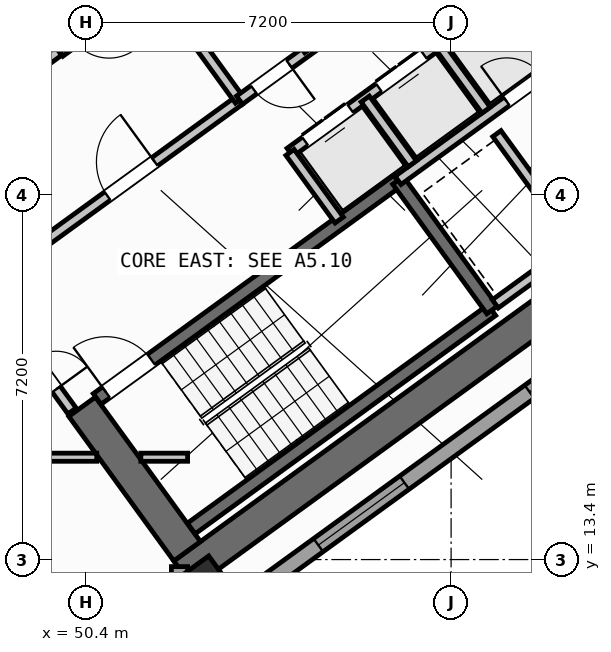
"""IFC4 building model, lengths in metres.
Left out: names, types, materials, properties, quantities, classifications, styles, units other than length and angle.
Written with IfcOpenShell. Run it as: python <this file> out.ifc"""

import sys

from ifc_helpers import new_model, si_unit, direction, frame, frame_2d, origin, origin_2d, place, context, subcontext, project, spatial, rectangle, hollow_rectangle, extrude, source, transform, mapped, element, fill, save


model = new_model("IFC4")
c1 = context("Model", 3, precision=1e-05, world=origin(), true_north=direction((0.0, 1.0)))
c2 = subcontext(c1, "Body", "Model", "MODEL_VIEW")
j1 = project(units=[si_unit("LENGTHUNIT", "METRE"), si_unit("PLANEANGLEUNIT", "RADIAN")], contexts=[c1])
p1 = place(None, origin())
s1 = spatial("IfcSite", under=j1, at=p1, CompositionType="ELEMENT")
p2 = place(p1, origin())
s2 = spatial("IfcBuilding", under=s1, at=p2, CompositionType="ELEMENT")
p3 = place(p2, frame((0.0, 0.0, 81.0)))
s3 = spatial("IfcBuildingStorey", under=s2, at=p3, CompositionType="ELEMENT", Elevation=81.0)
p4 = place(p3, frame((52.318, 13.11, 0.0), z_axis=(0.0, 0.0, 1.0), x_axis=(0.809019445368, 0.587781878776, 0.0)))
e1 = element("IfcWall", 1, at=p4, inside=s3, PredefinedType="SHEAR", context=c2, shape_type="SweptSolid", body=[
    extrude(rectangle(XDim=12.44, YDim=0.65, at=frame_2d((6.22, 0.0))), origin(), (0.0, 0.0, 1.0), 3.32),
])
p5 = place(p3, frame((52.39, 13.564, 0.0), z_axis=(0.0, 0.0, 1.0), x_axis=(-0.58779688989, 0.809008539037, 0.0)))
e2 = element("IfcWall", 2, at=p5, inside=s3, PredefinedType="SHEAR", context=c2, shape_type="SweptSolid", body=[
    extrude(rectangle(XDim=3.525, YDim=0.65, at=frame_2d((1.763, 0.0))), origin(), (0.0, 0.0, 1.0), 3.32),
])
m1 = source(origin(), c2, "Body", "SweptSolid", [
    extrude(hollow_rectangle(XDim=1.0, YDim=1.0, WallThickness=0.04, at=origin_2d()), origin(), (0.0, 0.0, 1.0), 3.6),
])
p6 = place(p3, frame((52.705, 12.773, 0.0), z_axis=(0.0, 0.0, 1.0), x_axis=(0.809016994375, 0.587785252292, 0.0)))
e3 = element("IfcColumn", 3, at=p6, inside=s3, PredefinedType="COLUMN", context=c2, shape_type="MappedRepresentation", body=[
    mapped(m1, transform((0.0, 0.0, 0.0), scale=1.0)),
])
p7 = place(p3, frame((54.81, 40.5, 0.0), z_axis=(0.0, 0.0, 1.0), x_axis=(0.587783625747, -0.809018176127, 0.0)))
e4 = element("IfcWall", 4, at=p7, inside=s3, PredefinedType="STANDARD", context=c2, shape_type="SweptSolid", body=[
    extrude(rectangle(XDim=21.587, YDim=0.32, at=frame_2d((10.794, 0.0))), origin(), (0.0, 0.0, 1.0), 2.745),
])
p8 = place(p7, frame((2.356, 0.0, 0.8)))
e5 = element("IfcOpeningElement", 5, at=p8, cuts=e4, PredefinedType="OPENING", context=c2, shape_type="SweptSolid", body=[
    extrude(rectangle(XDim=2.1, YDim=1.55, at=frame_2d((1.05, 0.775))), frame((0.0, 0.17, 0.0), z_axis=(0.0, -1.0, 0.0), x_axis=(1.0, 0.0, 0.0)), (0.0, 0.0, 1.0), 0.34),
])
p9 = place(p7, frame((9.344, 0.0, 0.85)))
e6 = element("IfcOpeningElement", 6, at=p9, cuts=e4, PredefinedType="OPENING", context=c2, shape_type="SweptSolid", body=[
    extrude(rectangle(XDim=1.8, YDim=1.5, at=frame_2d((0.9, 0.75))), frame((0.0, 0.17, 0.0), z_axis=(0.0, -1.0, 0.0), x_axis=(1.0, 0.0, 0.0)), (0.0, 0.0, 1.0), 0.34),
])
p10 = place(p7, frame((19.209, 0.0, 1.0)))
e7 = element("IfcOpeningElement", 7, at=p10, cuts=e4, PredefinedType="OPENING", context=c2, shape_type="SweptSolid", body=[
    extrude(rectangle(XDim=0.9, YDim=1.25, at=frame_2d((0.45, 0.625))), frame((0.0, 0.17, 0.0), z_axis=(0.0, -1.0, 0.0), x_axis=(1.0, 0.0, 0.0)), (0.0, 0.0, 1.0), 0.34),
])
p11 = place(p3, frame((67.454, 22.747, 0.0), z_axis=(0.0, 0.0, 1.0), x_axis=(-0.809021120468, -0.587779573171, 0.0)))
e8 = element("IfcWall", 8, at=p11, inside=s3, PredefinedType="STANDARD", context=c2, shape_type="SweptSolid", body=[
    extrude(rectangle(XDim=17.588, YDim=0.32, at=frame_2d((8.794, 0.0))), origin(), (0.0, 0.0, 1.0), 3.32),
])
p12 = place(p11, frame((1.624, 0.0, 0.0)))
e9 = element("IfcOpeningElement", 9, at=p12, cuts=e8, PredefinedType="OPENING", context=c2, shape_type="SweptSolid", body=[
    extrude(rectangle(XDim=1.05, YDim=2.15, at=frame_2d((0.525, 1.075))), frame((0.0, 0.17, 0.0), z_axis=(0.0, -1.0, 0.0), x_axis=(1.0, 0.0, 0.0)), (0.0, 0.0, 1.0), 0.34),
])
p13 = place(p11, frame((8.169, 0.0, 0.8)))
e10 = element("IfcOpeningElement", 10, at=p13, cuts=e8, PredefinedType="OPENING", context=c2, shape_type="SweptSolid", body=[
    extrude(rectangle(XDim=2.1, YDim=1.55, at=frame_2d((1.05, 0.775))), frame((0.0, 0.17, 0.0), z_axis=(0.0, -1.0, 0.0), x_axis=(1.0, 0.0, 0.0)), (0.0, 0.0, 1.0), 0.34),
])
p14 = place(p11, frame((13.319, 0.0, 0.8)))
e11 = element("IfcOpeningElement", 11, at=p14, cuts=e8, PredefinedType="OPENING", context=c2, shape_type="SweptSolid", body=[
    extrude(rectangle(XDim=2.1, YDim=1.55, at=frame_2d((1.05, 0.775))), frame((0.0, 0.17, 0.0), z_axis=(0.0, -1.0, 0.0), x_axis=(1.0, 0.0, 0.0)), (0.0, 0.0, 1.0), 0.34),
])
p15 = place(p3, frame((52.24, 13.261, 0.0), z_axis=(0.0, 0.0, 1.0), x_axis=(0.0, -1.0, 0.0)))
e12 = element("IfcWall", 12, at=p15, inside=s3, PredefinedType="STANDARD", context=c2, shape_type="SweptSolid", body=[
    extrude(rectangle(XDim=9.795, YDim=0.32, at=frame_2d((4.897, 0.0))), origin(), (0.0, 0.0, 1.0), 3.32),
])
p16 = place(p15, frame((2.199, 0.0, 0.8)))
e13 = element("IfcOpeningElement", 13, at=p16, cuts=e12, PredefinedType="OPENING", context=c2, shape_type="SweptSolid", body=[
    extrude(rectangle(XDim=2.1, YDim=1.55, at=frame_2d((1.05, 0.775))), frame((0.0, 0.17, 0.0), z_axis=(0.0, -1.0, 0.0), x_axis=(1.0, 0.0, 0.0)), (0.0, 0.0, 1.0), 0.34),
])
p17 = place(p15, frame((6.88, 0.0, 0.85)))
e14 = element("IfcOpeningElement", 14, at=p17, cuts=e12, PredefinedType="OPENING", context=c2, shape_type="SweptSolid", body=[
    extrude(rectangle(XDim=1.8, YDim=1.5, at=frame_2d((0.9, 0.75))), frame((0.0, 0.17, 0.0), z_axis=(0.0, -1.0, 0.0), x_axis=(1.0, 0.0, 0.0)), (0.0, 0.0, 1.0), 0.34),
])
p18 = place(p3, frame((49.863, 23.44, 0.0), z_axis=(0.0, 0.0, 1.0), x_axis=(0.809003474932, 0.587803859759, 0.0)))
e15 = element("IfcWall", 15, at=p18, inside=s3, PredefinedType="SHEAR", context=c2, shape_type="SweptSolid", body=[
    extrude(rectangle(XDim=7.46, YDim=0.26, at=frame_2d((3.73, 0.0))), origin(), (0.0, 0.0, 1.0), 3.32),
])
p19 = place(p18, frame((0.36, 0.0, 0.0)))
e16 = element("IfcOpeningElement", 16, at=p19, cuts=e15, PredefinedType="OPENING", context=c2, shape_type="SweptSolid", body=[
    extrude(rectangle(XDim=0.86, YDim=2.05, at=frame_2d((0.43, 1.025))), frame((0.0, 0.14, 0.0), z_axis=(0.0, -1.0, 0.0), x_axis=(1.0, 0.0, 0.0)), (0.0, 0.0, 1.0), 0.28),
])
p20 = place(p3, frame((49.855, 23.434, 0.0), z_axis=(0.0, 0.0, 1.0), x_axis=(-0.58776738483, 0.809029975545, 0.0)))
e17 = element("IfcWall", 17, at=p20, inside=s3, PredefinedType="SHEAR", context=c2, shape_type="SweptSolid", body=[
    extrude(rectangle(XDim=3.16, YDim=0.26, at=frame_2d((1.58, 0.0))), origin(), (0.0, 0.0, 1.0), 3.32),
])
p21 = place(p3, frame((52.472, 14.013, 0.0), z_axis=(0.0, 0.0, 1.0), x_axis=(0.809028366311, 0.587769599847, 0.0)))
e18 = element("IfcWall", 18, at=p21, inside=s3, PredefinedType="SHEAR", context=c2, shape_type="SweptSolid", body=[
    extrude(rectangle(XDim=7.33, YDim=0.26, at=frame_2d((3.665, 0.0))), origin(), (0.0, 0.0, 1.0), 3.32),
])
p22 = place(p3, frame((50.615, 16.57, 0.0), z_axis=(0.0, 0.0, 1.0), x_axis=(0.809028366311, 0.587769599847, 0.0)))
e19 = element("IfcWall", 19, at=p22, inside=s3, PredefinedType="SHEAR", context=c2, shape_type="SweptSolid", body=[
    extrude(rectangle(XDim=7.33, YDim=0.26, at=frame_2d((3.665, 0.0))), origin(), (0.0, 0.0, 1.0), 3.32),
])
p23 = place(p22, frame((0.22, 0.0, 0.0)))
e20 = element("IfcOpeningElement", 20, at=p23, cuts=e19, PredefinedType="OPENING", context=c2, shape_type="SweptSolid", body=[
    extrude(rectangle(XDim=1.1, YDim=2.1, at=frame_2d((0.55, 1.05))), frame((0.0, 0.14, 0.0), z_axis=(0.0, -1.0, 0.0), x_axis=(1.0, 0.0, 0.0)), (0.0, 0.0, 1.0), 0.28),
])
p24 = place(p3, frame((58.41, 18.327, 0.0), z_axis=(0.0, 0.0, 1.0), x_axis=(-0.58776738483, 0.809029975545, 0.0)))
e21 = element("IfcWall", 21, at=p24, inside=s3, PredefinedType="SHEAR", context=c2, shape_type="SweptSolid", body=[
    extrude(rectangle(XDim=3.16, YDim=0.26, at=frame_2d((1.58, 0.0))), origin(), (0.0, 0.0, 1.0), 3.32),
])
p25 = place(p3, frame((47.106, 21.437, 0.0), z_axis=(0.0, 0.0, 1.0), x_axis=(0.809012514015, 0.58779141893, 0.0)))
e22 = element("IfcWall", 22, at=p25, inside=s3, PredefinedType="STANDARD", context=c2, shape_type="SweptSolid", body=[
    extrude(rectangle(XDim=3.398, YDim=0.2, at=frame_2d((1.699, 0.0))), origin(), (0.0, 0.0, 1.0), 3.31),
])
p26 = place(p25, frame((0.408, 0.0, 0.0)))
e23 = element("IfcOpeningElement", 23, at=p26, cuts=e22, PredefinedType="OPENING", context=c2, shape_type="SweptSolid", body=[
    extrude(rectangle(XDim=1.3, YDim=2.2, at=frame_2d((0.65, 1.1))), frame((0.0, 0.11, 0.0), z_axis=(0.0, -1.0, 0.0), x_axis=(1.0, 0.0, 0.0)), (0.0, 0.0, 1.0), 0.22),
])
p27 = place(p3, frame((48.799, 19.107, 0.0), z_axis=(0.0, 0.0, 1.0), x_axis=(0.809012959416, 0.587790805897, 0.0)))
e24 = element("IfcWall", 24, at=p27, inside=s3, PredefinedType="STANDARD", context=c2, shape_type="SweptSolid", body=[
    extrude(rectangle(XDim=5.718, YDim=0.2, at=frame_2d((2.859, 0.0))), origin(), (0.0, 0.0, 1.0), 3.31),
])
p28 = place(p27, frame((2.498, 0.0, 0.0)))
e25 = element("IfcOpeningElement", 25, at=p28, cuts=e24, PredefinedType="OPENING", context=c2, shape_type="SweptSolid", body=[
    extrude(rectangle(XDim=1.15, YDim=2.1, at=frame_2d((0.575, 1.05))), frame((0.0, 0.11, 0.0), z_axis=(0.0, -1.0, 0.0), x_axis=(1.0, 0.0, 0.0)), (0.0, 0.0, 1.0), 0.22),
])
p29 = place(p3, frame((56.553, 20.884, 0.0), z_axis=(0.0, 0.0, 1.0), x_axis=(0.809035789462, 0.587759382205, 0.0)))
e26 = element("IfcWall", 26, at=p29, inside=s3, PredefinedType="STANDARD", context=c2, shape_type="SweptSolid", body=[
    extrude(rectangle(XDim=3.768, YDim=0.2, at=frame_2d((1.884, 0.0))), origin(), (0.0, 0.0, 1.0), 3.31),
])
p30 = place(p29, frame((2.65, 0.0, 0.0)))
e27 = element("IfcOpeningElement", 27, at=p30, cuts=e26, PredefinedType="OPENING", context=c2, shape_type="SweptSolid", body=[
    extrude(rectangle(XDim=0.86, YDim=2.05, at=frame_2d((0.43, 1.025))), frame((0.0, 0.11, 0.0), z_axis=(0.0, -1.0, 0.0), x_axis=(1.0, 0.0, 0.0)), (0.0, 0.0, 1.0), 0.22),
])
p31 = place(p3, frame((54.421, 21.436, 0.0), z_axis=(0.0, 0.0, 1.0), x_axis=(0.809013710463, 0.587789772183, 0.0)))
e28 = element("IfcWall", 28, at=p31, inside=s3, PredefinedType="STANDARD", context=c2, shape_type="SweptSolid", body=[
    extrude(rectangle(XDim=5.36, YDim=0.2, at=frame_2d((2.68, 0.0))), origin(), (0.0, 0.0, 1.0), 3.31),
])
p32 = place(p31, frame((0.37, 0.0, 0.0)))
e29 = element("IfcOpeningElement", 29, at=p32, cuts=e28, PredefinedType="OPENING", context=c2, shape_type="SweptSolid", body=[
    extrude(rectangle(XDim=1.1, YDim=2.15, at=frame_2d((0.55, 1.075))), frame((0.0, 0.11, 0.0), z_axis=(0.0, -1.0, 0.0), x_axis=(1.0, 0.0, 0.0)), (0.0, 0.0, 1.0), 0.22),
])
p33 = place(p31, frame((2.17, 0.0, 0.0)))
e30 = element("IfcOpeningElement", 30, at=p33, cuts=e28, PredefinedType="OPENING", context=c2, shape_type="SweptSolid", body=[
    extrude(rectangle(XDim=1.1, YDim=2.15, at=frame_2d((0.55, 1.075))), frame((0.0, 0.11, 0.0), z_axis=(0.0, -1.0, 0.0), x_axis=(1.0, 0.0, 0.0)), (0.0, 0.0, 1.0), 0.22),
])
p34 = place(p31, frame((3.97, 0.0, 0.0)))
e31 = element("IfcOpeningElement", 31, at=p34, cuts=e28, PredefinedType="OPENING", context=c2, shape_type="SweptSolid", body=[
    extrude(rectangle(XDim=1.1, YDim=2.15, at=frame_2d((0.55, 1.075))), frame((0.0, 0.11, 0.0), z_axis=(0.0, -1.0, 0.0), x_axis=(1.0, 0.0, 0.0)), (0.0, 0.0, 1.0), 0.22),
])
p35 = place(p3, frame((55.391, 20.102, 0.0), z_axis=(0.0, 0.0, 1.0), x_axis=(-0.58778447739, 0.809017557374, 0.0)))
e32 = element("IfcWall", 32, at=p35, inside=s3, PredefinedType="STANDARD", context=c2, shape_type="SweptSolid", body=[
    extrude(rectangle(XDim=1.65, YDim=0.2, at=frame_2d((0.825, 0.0))), origin(), (0.0, 0.0, 1.0), 3.31),
])
p36 = place(p3, frame((56.834, 21.212, 0.0), z_axis=(0.0, 0.0, 1.0), x_axis=(-0.58776738483, 0.809029975545, 0.0)))
e33 = element("IfcWall", 33, at=p36, inside=s3, PredefinedType="STANDARD", context=c2, shape_type="SweptSolid", body=[
    extrude(rectangle(XDim=1.58, YDim=0.2, at=frame_2d((0.79, 0.0))), origin(), (0.0, 0.0, 1.0), 3.31),
])
p37 = place(p3, frame((58.29, 22.27, 0.0), z_axis=(0.0, 0.0, 1.0), x_axis=(-0.587840865826, 0.808976585857, 0.0)))
e34 = element("IfcWall", 34, at=p37, inside=s3, PredefinedType="STANDARD", context=c2, shape_type="SweptSolid", body=[
    extrude(rectangle(XDim=1.58, YDim=0.2, at=frame_2d((0.79, 0.0))), origin(), (0.0, 0.0, 1.0), 3.31),
])
p38 = place(p3, frame((60.067, 19.655, 0.0), z_axis=(0.0, 0.0, 1.0), x_axis=(-0.587800520745, 0.809005900975, 0.0)))
e35 = element("IfcWall", 35, at=p38, inside=s3, PredefinedType="STANDARD", context=c2, shape_type="SweptSolid", body=[
    extrude(rectangle(XDim=2.66, YDim=0.2, at=frame_2d((1.33, 0.0))), origin(), (0.0, 0.0, 1.0), 3.31),
])
p39 = place(p3, frame((58.472, 18.447, 0.0), z_axis=(0.0, 0.0, 1.0), x_axis=(0.809022487728, 0.587777691266, 0.0)))
e36 = element("IfcWall", 36, at=p39, inside=s3, PredefinedType="STANDARD", context=c2, shape_type="SweptSolid", body=[
    extrude(rectangle(XDim=3.648, YDim=0.2, at=frame_2d((1.824, 0.0))), origin(), (0.0, 0.0, 1.0), 3.31),
])
p40 = place(p3, frame((53.425, 22.468, 0.0), z_axis=(0.0, 0.0, 1.0), x_axis=(-0.5877230039, 0.809062216821, 0.0)))
e37 = element("IfcWall", 37, at=p40, inside=s3, PredefinedType="STANDARD", context=c2, shape_type="SweptSolid", body=[
    extrude(rectangle(XDim=2.88, YDim=0.2, at=frame_2d((1.44, 0.0))), origin(), (0.0, 0.0, 1.0), 3.31),
])
p41 = place(p3, frame((53.425, 22.468, 0.0), z_axis=(0.0, 0.0, 1.0), x_axis=(0.80902705128, 0.587771409902, 0.0)))
e38 = element("IfcWall", 38, at=p41, inside=s3, PredefinedType="STANDARD", context=c2, shape_type="SweptSolid", body=[
    extrude(rectangle(XDim=5.368, YDim=0.2, at=frame_2d((2.684, 0.0))), origin(), (0.0, 0.0, 1.0), 3.31),
])
p42 = place(p41, frame((4.28, 0.0, 0.0)))
e39 = element("IfcOpeningElement", 39, at=p42, cuts=e38, PredefinedType="OPENING", context=c2, shape_type="SweptSolid", body=[
    extrude(rectangle(XDim=0.86, YDim=2.05, at=frame_2d((0.43, 1.025))), frame((0.0, 0.11, 0.0), z_axis=(0.0, -1.0, 0.0), x_axis=(1.0, 0.0, 0.0)), (0.0, 0.0, 1.0), 0.22),
])
p43 = place(p41, frame((0.35, 0.0, 0.0)))
e40 = element("IfcOpeningElement", 40, at=p43, cuts=e38, PredefinedType="OPENING", context=c2, shape_type="SweptSolid", body=[
    extrude(rectangle(XDim=0.86, YDim=2.05, at=frame_2d((0.43, 1.025))), frame((0.0, 0.11, 0.0), z_axis=(0.0, -1.0, 0.0), x_axis=(1.0, 0.0, 0.0)), (0.0, 0.0, 1.0), 0.22),
])
p44 = place(p3, frame((54.768, 23.443, 0.0), z_axis=(0.0, 0.0, 1.0), x_axis=(-0.587736077749, 0.809052719489, 0.0)))
e41 = element("IfcWall", 41, at=p44, inside=s3, PredefinedType="PLUMBINGWALL", context=c2, shape_type="SweptSolid", body=[
    extrude(rectangle(XDim=1.4, YDim=0.14, at=frame_2d((0.7, 0.0))), origin(), (0.0, 0.0, 1.0), 3.31),
])
p45 = place(p44, frame((0.28, 0.0, 0.0)))
e42 = element("IfcOpeningElement", 42, at=p45, cuts=e41, PredefinedType="OPENING", context=c2, shape_type="SweptSolid", body=[
    extrude(rectangle(XDim=0.78, YDim=2.05, at=frame_2d((0.39, 1.025))), frame((0.0, 0.08, 0.0), z_axis=(0.0, -1.0, 0.0), x_axis=(1.0, 0.0, 0.0)), (0.0, 0.0, 1.0), 0.16),
])
p46 = place(p3, frame((35.296, 15.42, 0.0), z_axis=(0.0, 0.0, 1.0), x_axis=(1.0, 0.0, 0.0)))
e43 = element("IfcWall", 43, at=p46, inside=s3, PredefinedType="PARTITIONING", context=c2, shape_type="SweptSolid", body=[
    extrude(rectangle(XDim=15.311, YDim=0.16, at=frame_2d((7.655, 0.0))), origin(), (0.0, 0.0, 1.0), 3.31),
])
p47 = place(p46, frame((0.91, 0.0, 0.0)))
e44 = element("IfcOpeningElement", 44, at=p47, cuts=e43, PredefinedType="OPENING", context=c2, shape_type="SweptSolid", body=[
    extrude(rectangle(XDim=1.0, YDim=2.1, at=frame_2d((0.5, 1.05))), frame((0.0, 0.09, 0.0), z_axis=(0.0, -1.0, 0.0), x_axis=(1.0, 0.0, 0.0)), (0.0, 0.0, 1.0), 0.18),
])
p48 = place(p46, frame((8.74, 0.0, 0.0)))
e45 = element("IfcOpeningElement", 45, at=p48, cuts=e43, PredefinedType="OPENING", context=c2, shape_type="SweptSolid", body=[
    extrude(rectangle(XDim=1.0, YDim=2.1, at=frame_2d((0.5, 1.05))), frame((0.0, 0.09, 0.0), z_axis=(0.0, -1.0, 0.0), x_axis=(1.0, 0.0, 0.0)), (0.0, 0.0, 1.0), 0.18),
])
p49 = place(p3, frame((51.477, 15.42, 0.0), z_axis=(0.0, 0.0, 1.0), x_axis=(1.0, 0.0, 0.0)))
e46 = element("IfcWall", 46, at=p49, inside=s3, PredefinedType="PARTITIONING", context=c2, shape_type="SweptSolid", body=[
    extrude(rectangle(XDim=0.923, YDim=0.16, at=frame_2d((0.461, 0.0))), origin(), (0.0, 0.0, 1.0), 3.31),
])
p50 = place(p3, frame((50.119, 16.333, 0.0), z_axis=(0.0, 0.0, 1.0), x_axis=(-0.587749856981, 0.809042709391, 0.0)))
e47 = element("IfcWall", 47, at=p50, inside=s3, PredefinedType="STANDARD", context=c2, shape_type="SweptSolid", body=[
    extrude(rectangle(XDim=2.96, YDim=0.2, at=frame_2d((1.48, 0.0))), origin(), (0.0, 0.0, 1.0), 3.31),
])
p51 = place(p50, frame((0.53, 0.0, 0.0)))
e48 = element("IfcOpeningElement", 48, at=p51, cuts=e47, PredefinedType="OPENING", context=c2, shape_type="SweptSolid", body=[
    extrude(rectangle(XDim=1.5, YDim=2.15, at=frame_2d((0.75, 1.075))), frame((0.0, 0.11, 0.0), z_axis=(0.0, -1.0, 0.0), x_axis=(1.0, 0.0, 0.0)), (0.0, 0.0, 1.0), 0.22),
])
p52 = place(p3, frame((59.827, 23.386, 0.0), z_axis=(0.0, 0.0, 1.0), x_axis=(-0.587803840107, 0.809003489211, 0.0)))
e49 = element("IfcWall", 49, at=p52, inside=s3, PredefinedType="STANDARD", context=c2, shape_type="SweptSolid", body=[
    extrude(rectangle(XDim=2.96, YDim=0.2, at=frame_2d((1.48, 0.0))), origin(), (0.0, 0.0, 1.0), 3.31),
])
p53 = place(p52, frame((1.68, 0.0, 0.0)))
e50 = element("IfcOpeningElement", 50, at=p53, cuts=e49, PredefinedType="OPENING", context=c2, shape_type="SweptSolid", body=[
    extrude(rectangle(XDim=1.0, YDim=2.1, at=frame_2d((0.5, 1.05))), frame((0.0, 0.11, 0.0), z_axis=(0.0, -1.0, 0.0), x_axis=(1.0, 0.0, 0.0)), (0.0, 0.0, 1.0), 0.22),
])
m2 = source(origin(), c2, "Body", "SweptSolid", [
    extrude(rectangle(XDim=2.1, YDim=1.55, at=frame_2d((1.05, 0.775))), frame((0.0, 0.03, 0.0), z_axis=(0.0, -1.0, 0.0), x_axis=(1.0, 0.0, 0.0)), (0.0, 0.0, 1.0), 0.06),
])
p54 = place(p13, origin())
e51 = element("IfcWindow", 51, at=p54, inside=s3, PartitioningType="SINGLE_PANEL", PredefinedType="WINDOW", context=c2, shape_type="MappedRepresentation", body=[
    mapped(m2, transform((0.0, 0.0, 0.0), scale=1.0)),
])
fill(e10, e51)
p55 = place(p14, origin())
e52 = element("IfcWindow", 52, at=p55, inside=s3, PartitioningType="SINGLE_PANEL", PredefinedType="WINDOW", context=c2, shape_type="MappedRepresentation", body=[
    mapped(m2, transform((0.0, 0.0, 0.0), scale=1.0)),
])
fill(e11, e52)
m3 = source(origin(), c2, "Body", "SweptSolid", [
    extrude(rectangle(XDim=1.1, YDim=2.1, at=frame_2d((0.55, 1.05))), frame((0.0, 0.025, 0.0), z_axis=(0.0, -1.0, 0.0), x_axis=(1.0, 0.0, 0.0)), (0.0, 0.0, 1.0), 0.05),
])
p56 = place(p23, origin())
e53 = element("IfcDoor", 53, at=p56, inside=s3, OperationType="SINGLE_SWING_LEFT", PredefinedType="DOOR", context=c2, shape_type="MappedRepresentation", body=[
    mapped(m3, transform((0.0, 0.0, 0.0), scale=1.0)),
])
fill(e20, e53)
m4 = source(origin(), c2, "Body", "SweptSolid", [
    extrude(rectangle(XDim=1.15, YDim=2.1, at=frame_2d((0.575, 1.05))), frame((0.0, 0.025, 0.0), z_axis=(0.0, -1.0, 0.0), x_axis=(1.0, 0.0, 0.0)), (0.0, 0.0, 1.0), 0.05),
])
p57 = place(p28, origin())
e54 = element("IfcDoor", 54, at=p57, inside=s3, OperationType="SINGLE_SWING_RIGHT", PredefinedType="DOOR", context=c2, shape_type="MappedRepresentation", body=[
    mapped(m4, transform((0.0, 0.0, 0.0), scale=1.0)),
])
fill(e25, e54)
m5 = source(origin(), c2, "Body", "SweptSolid", [
    extrude(rectangle(XDim=1.1, YDim=2.15, at=frame_2d((0.55, 1.075))), frame((0.0, 0.025, 0.0), z_axis=(0.0, -1.0, 0.0), x_axis=(1.0, 0.0, 0.0)), (0.0, 0.0, 1.0), 0.05),
])
p58 = place(p32, origin())
e55 = element("IfcDoor", 55, at=p58, inside=s3, OperationType="DOUBLE_DOOR_SLIDING", PredefinedType="DOOR", context=c2, shape_type="MappedRepresentation", body=[
    mapped(m5, transform((0.0, 0.0, 0.0), scale=1.0)),
])
fill(e29, e55)
p59 = place(p33, origin())
e56 = element("IfcDoor", 56, at=p59, inside=s3, OperationType="DOUBLE_DOOR_SLIDING", PredefinedType="DOOR", context=c2, shape_type="MappedRepresentation", body=[
    mapped(m5, transform((0.0, 0.0, 0.0), scale=1.0)),
])
fill(e30, e56)
m6 = source(origin(), c2, "Body", "SweptSolid", [
    extrude(rectangle(XDim=0.86, YDim=2.05, at=frame_2d((0.43, 1.025))), frame((0.0, 0.025, 0.0), z_axis=(0.0, -1.0, 0.0), x_axis=(1.0, 0.0, 0.0)), (0.0, 0.0, 1.0), 0.05),
])
p60 = place(p30, origin())
e57 = element("IfcDoor", 57, at=p60, inside=s3, OperationType="SINGLE_SWING_LEFT", PredefinedType="DOOR", context=c2, shape_type="MappedRepresentation", body=[
    mapped(m6, transform((0.0, 0.0, 0.0), scale=1.0)),
])
fill(e27, e57)
p61 = place(p43, frame((0.86, 0.0, 0.0), z_axis=(0.0, 0.0, 1.0), x_axis=(-1.0, 0.0, 0.0)))
e58 = element("IfcDoor", 58, at=p61, inside=s3, OperationType="SINGLE_SWING_LEFT", PredefinedType="DOOR", context=c2, shape_type="MappedRepresentation", body=[
    mapped(m6, transform((0.0, 0.0, 0.0), scale=1.0)),
])
fill(e40, e58)
m7 = source(origin(), c2, "Body", "SweptSolid", [
    extrude(rectangle(XDim=1.5, YDim=2.15, at=frame_2d((0.75, 1.075))), frame((0.0, 0.025, 0.0), z_axis=(0.0, -1.0, 0.0), x_axis=(1.0, 0.0, 0.0)), (0.0, 0.0, 1.0), 0.05),
])
p62 = place(p51, frame((1.5, 0.0, 0.0), z_axis=(0.0, 0.0, 1.0), x_axis=(-1.0, 0.0, 0.0)))
e59 = element("IfcDoor", 59, at=p62, inside=s3, OperationType="DOUBLE_DOOR_SINGLE_SWING", PredefinedType="DOOR", context=c2, shape_type="MappedRepresentation", body=[
    mapped(m7, transform((0.0, 0.0, 0.0), scale=1.0)),
])
fill(e48, e59)
save(model, sys.argv[1])
